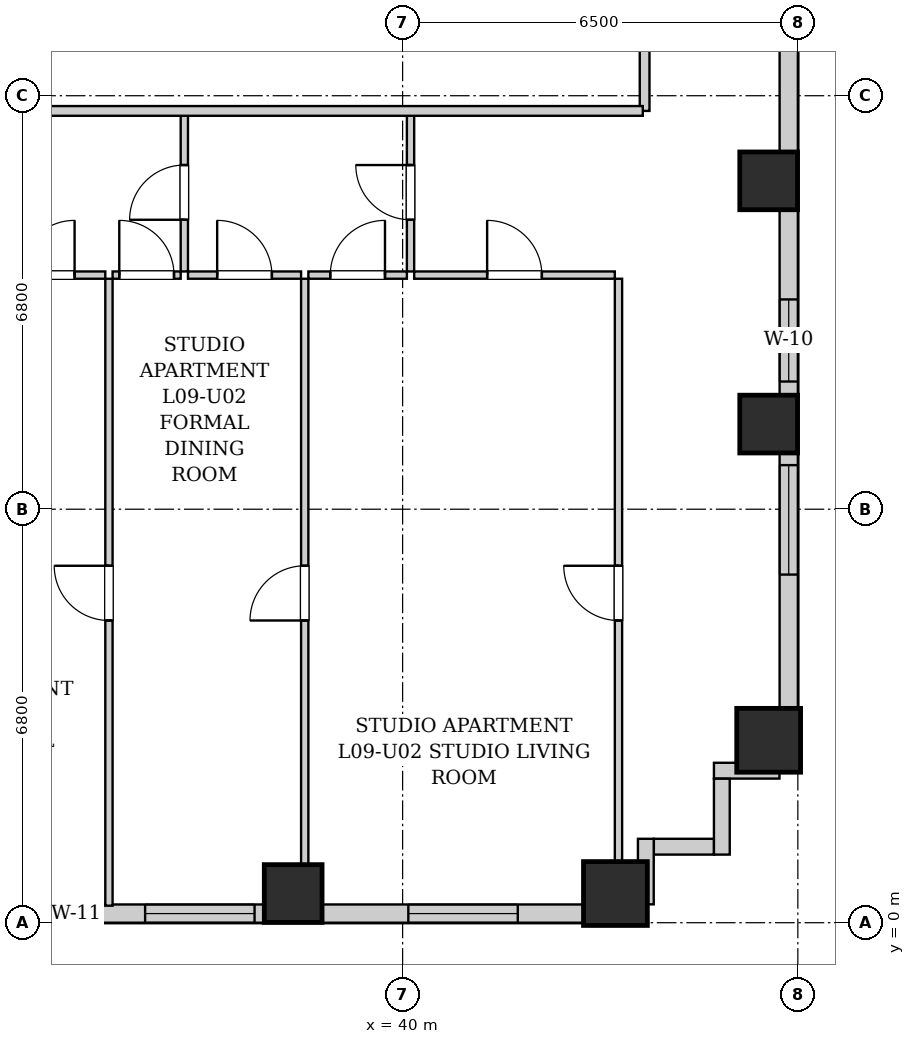
"""IFC4 building model, lengths in metres.
Left out: names, types, materials, properties, quantities, classifications, styles, units other than length and angle.
Written with IfcOpenShell. Run it as: python <this file> out.ifc"""

import sys

from ifc_helpers import new_model, si_unit, direction, frame, frame_2d, origin, origin_2d, place, context, subcontext, project, spatial, rectangle, extrude, element, fill, save


model = new_model("IFC4")
c1 = context("Model", 3, precision=1e-05, world=origin(), true_north=direction((0.0, 1.0)))
c2 = subcontext(c1, "Body", "Model", "MODEL_VIEW")
j1 = project(units=[si_unit("LENGTHUNIT", "METRE"), si_unit("PLANEANGLEUNIT", "RADIAN")], contexts=[c1])
p1 = place(None, origin())
s1 = spatial("IfcSite", under=j1, at=p1, CompositionType="ELEMENT")
p2 = place(p1, origin())
s2 = spatial("IfcBuilding", under=s1, at=p2, CompositionType="ELEMENT")
p3 = place(p2, frame((0.0, 0.0, 38.6)))
s3 = spatial("IfcBuildingStorey", under=s2, at=p3, CompositionType="ELEMENT", Elevation=38.6)
p4 = place(p3, frame((38.2, 0.48, 0.0), z_axis=(0.0, 0.0, 1.0), x_axis=(1.0, 0.0, 0.0)))
e1 = element("IfcColumn", 1, at=p4, inside=s3, PredefinedType="COLUMN", context=c2, shape_type="SweptSolid", body=[
    extrude(rectangle(XDim=0.95, YDim=0.95, at=origin_2d()), origin(), (0.0, 0.0, 1.0), 3.2),
])
for number, where, z_axis, x_axis in (
    (2, (43.5, 0.48, 0.0), (0.0, 0.0, 1.0), (1.0, 0.0, 0.0)),
    (3, (46.02, 3.0, 0.0), (0.0, 0.0, 1.0), (1.0, 0.0, 0.0)),
):
    element("IfcColumn", number, at=place(p3, frame(where, z_axis=z_axis, x_axis=x_axis)), inside=s3, PredefinedType="COLUMN", context=c2, shape_type="SweptSolid", body=[
        extrude(rectangle(XDim=1.05, YDim=1.05, at=origin_2d()), origin(), (0.0, 0.0, 1.0), 3.2),
    ])
for number, where, z_axis, x_axis in (
    (4, (46.02, 8.2, 0.0), (0.0, 0.0, 1.0), (1.0, 0.0, 0.0)),
    (5, (46.02, 12.2, 0.0), (0.0, 0.0, 1.0), (1.0, 0.0, 0.0)),
):
    element("IfcColumn", number, at=place(p3, frame(where, z_axis=z_axis, x_axis=x_axis)), inside=s3, PredefinedType="COLUMN", context=c2, shape_type="SweptSolid", body=[
        extrude(rectangle(XDim=0.95, YDim=0.95, at=origin_2d()), origin(), (0.0, 0.0, 1.0), 3.2),
    ])
p5 = place(p3, frame((46.35, 45.1, 0.0), z_axis=(0.0, 0.0, 1.0), x_axis=(0.0, -1.0, 0.0)))
e6 = element("IfcWall", 6, at=p5, inside=s3, PredefinedType="SOLIDWALL", context=c2, shape_type="SweptSolid", body=[
    extrude(rectangle(XDim=42.6, YDim=0.3, at=frame_2d((21.3, 0.0))), origin(), (0.0, 0.0, 1.0), 1.975),
])
p6 = place(p5, frame((37.575, 0.0, 0.55)))
e7 = element("IfcOpeningElement", 7, at=p6, cuts=e6, PredefinedType="OPENING", context=c2, shape_type="SweptSolid", body=[
    extrude(rectangle(XDim=1.8, YDim=1.2, at=frame_2d((0.9, 0.6))), frame((0.0, 0.16, 0.0), z_axis=(0.0, -1.0, 0.0), x_axis=(1.0, 0.0, 0.0)), (0.0, 0.0, 1.0), 0.32),
])
p7 = place(p5, frame((34.85, 0.0, 0.55)))
e8 = element("IfcOpeningElement", 8, at=p7, cuts=e6, PredefinedType="OPENING", context=c2, shape_type="SweptSolid", body=[
    extrude(rectangle(XDim=1.35, YDim=1.2, at=frame_2d((0.675, 0.6))), frame((0.0, 0.16, 0.0), z_axis=(0.0, -1.0, 0.0), x_axis=(1.0, 0.0, 0.0)), (0.0, 0.0, 1.0), 0.32),
])
p8 = place(p5, frame((3.665, 0.0, 0.55)))
e9 = element("IfcOpeningElement", 9, at=p8, cuts=e6, PredefinedType="OPENING", context=c2, shape_type="SweptSolid", body=[
    extrude(rectangle(XDim=1.8, YDim=1.2, at=frame_2d((0.9, 0.6))), frame((0.0, 0.16, 0.0), z_axis=(0.0, -1.0, 0.0), x_axis=(1.0, 0.0, 0.0)), (0.0, 0.0, 1.0), 0.32),
])
p9 = place(p5, frame((1.185, 0.0, 0.55)))
e10 = element("IfcOpeningElement", 10, at=p9, cuts=e6, PredefinedType="OPENING", context=c2, shape_type="SweptSolid", body=[
    extrude(rectangle(XDim=1.35, YDim=1.2, at=frame_2d((0.675, 0.6))), frame((0.0, 0.16, 0.0), z_axis=(0.0, -1.0, 0.0), x_axis=(1.0, 0.0, 0.0)), (0.0, 0.0, 1.0), 0.32),
])
p10 = place(p5, frame((27.225, 0.0, 0.55)))
e11 = element("IfcOpeningElement", 11, at=p10, cuts=e6, PredefinedType="OPENING", context=c2, shape_type="SweptSolid", body=[
    extrude(rectangle(XDim=1.8, YDim=1.2, at=frame_2d((0.9, 0.6))), frame((0.0, 0.16, 0.0), z_axis=(0.0, -1.0, 0.0), x_axis=(1.0, 0.0, 0.0)), (0.0, 0.0, 1.0), 0.32),
])
p11 = place(p5, frame((17.1, 0.0, 0.55)))
e12 = element("IfcOpeningElement", 12, at=p11, cuts=e6, PredefinedType="OPENING", context=c2, shape_type="SweptSolid", body=[
    extrude(rectangle(XDim=1.8, YDim=1.2, at=frame_2d((0.9, 0.6))), frame((0.0, 0.16, 0.0), z_axis=(0.0, -1.0, 0.0), x_axis=(1.0, 0.0, 0.0)), (0.0, 0.0, 1.0), 0.32),
])
p12 = place(p3, frame((44.0, 0.15, 0.0), z_axis=(0.0, 0.0, 1.0), x_axis=(-1.0, 0.0, 0.0)))
e13 = element("IfcWall", 13, at=p12, inside=s3, PredefinedType="SOLIDWALL", context=c2, shape_type="SweptSolid", body=[
    extrude(rectangle(XDim=25.7, YDim=0.3, at=frame_2d((12.85, 0.0))), origin(), (0.0, 0.0, 1.0), 1.975),
])
p13 = place(p12, frame((22.471, 0.0, 0.55)))
e14 = element("IfcOpeningElement", 14, at=p13, cuts=e13, PredefinedType="OPENING", context=c2, shape_type="SweptSolid", body=[
    extrude(rectangle(XDim=1.8, YDim=1.2, at=frame_2d((0.9, 0.6))), frame((0.0, 0.16, 0.0), z_axis=(0.0, -1.0, 0.0), x_axis=(1.0, 0.0, 0.0)), (0.0, 0.0, 1.0), 0.32),
])
p14 = place(p12, frame((15.65, 0.0, 0.55)))
e15 = element("IfcOpeningElement", 15, at=p14, cuts=e13, PredefinedType="OPENING", context=c2, shape_type="SweptSolid", body=[
    extrude(rectangle(XDim=0.85, YDim=1.2, at=frame_2d((0.425, 0.6))), frame((0.0, 0.16, 0.0), z_axis=(0.0, -1.0, 0.0), x_axis=(1.0, 0.0, 0.0)), (0.0, 0.0, 1.0), 0.32),
])
p15 = place(p12, frame((12.777, 0.0, 0.55)))
e16 = element("IfcOpeningElement", 16, at=p15, cuts=e13, PredefinedType="OPENING", context=c2, shape_type="SweptSolid", body=[
    extrude(rectangle(XDim=1.8, YDim=1.2, at=frame_2d((0.9, 0.6))), frame((0.0, 0.16, 0.0), z_axis=(0.0, -1.0, 0.0), x_axis=(1.0, 0.0, 0.0)), (0.0, 0.0, 1.0), 0.32),
])
p16 = place(p12, frame((9.315, 0.0, 0.55)))
e17 = element("IfcOpeningElement", 17, at=p16, cuts=e13, PredefinedType="OPENING", context=c2, shape_type="SweptSolid", body=[
    extrude(rectangle(XDim=0.85, YDim=1.2, at=frame_2d((0.425, 0.6))), frame((0.0, 0.16, 0.0), z_axis=(0.0, -1.0, 0.0), x_axis=(1.0, 0.0, 0.0)), (0.0, 0.0, 1.0), 0.32),
])
p17 = place(p12, frame((6.435, 0.0, 0.55)))
e18 = element("IfcOpeningElement", 18, at=p17, cuts=e13, PredefinedType="OPENING", context=c2, shape_type="SweptSolid", body=[
    extrude(rectangle(XDim=1.8, YDim=1.2, at=frame_2d((0.9, 0.6))), frame((0.0, 0.16, 0.0), z_axis=(0.0, -1.0, 0.0), x_axis=(1.0, 0.0, 0.0)), (0.0, 0.0, 1.0), 0.32),
])
p18 = place(p12, frame((2.106, 0.0, 0.55)))
e19 = element("IfcOpeningElement", 19, at=p18, cuts=e13, PredefinedType="OPENING", context=c2, shape_type="SweptSolid", body=[
    extrude(rectangle(XDim=1.8, YDim=1.2, at=frame_2d((0.9, 0.6))), frame((0.0, 0.16, 0.0), z_axis=(0.0, -1.0, 0.0), x_axis=(1.0, 0.0, 0.0)), (0.0, 0.0, 1.0), 0.32),
])
p19 = place(p3, frame((46.198, 2.5, 0.0), z_axis=(0.0, 0.0, 1.0), x_axis=(-1.0, 0.0, 0.0)))
e20 = element("IfcWall", 20, at=p19, inside=s3, PredefinedType="SOLIDWALL", context=c2, shape_type="SweptSolid", body=[
    extrude(rectangle(XDim=1.078, YDim=0.26, at=frame_2d((0.539, 0.0))), origin(), (0.0, 0.0, 1.0), 2.94),
])
p20 = place(p3, frame((45.25, 2.368, 0.0), z_axis=(0.0, 0.0, 1.0), x_axis=(0.0, -1.0, 0.0)))
e21 = element("IfcWall", 21, at=p20, inside=s3, PredefinedType="SOLIDWALL", context=c2, shape_type="SweptSolid", body=[
    extrude(rectangle(XDim=1.248, YDim=0.26, at=frame_2d((0.624, 0.0))), origin(), (0.0, 0.0, 1.0), 2.94),
])
p21 = place(p3, frame((45.118, 1.25, 0.0), z_axis=(0.0, 0.0, 1.0), x_axis=(-1.0, 0.0, 0.0)))
e22 = element("IfcWall", 22, at=p21, inside=s3, PredefinedType="SOLIDWALL", context=c2, shape_type="SweptSolid", body=[
    extrude(rectangle(XDim=0.986, YDim=0.26, at=frame_2d((0.493, 0.0))), origin(), (0.0, 0.0, 1.0), 2.94),
])
p22 = place(p3, frame((44.0, 1.38, 0.0), z_axis=(0.0, 0.0, 1.0), x_axis=(0.0, -1.0, 0.0)))
e23 = element("IfcWall", 23, at=p22, inside=s3, PredefinedType="SOLIDWALL", context=c2, shape_type="SweptSolid", body=[
    extrude(rectangle(XDim=1.078, YDim=0.26, at=frame_2d((0.539, 0.0))), origin(), (0.0, 0.0, 1.0), 2.94),
])
p23 = place(p3, frame((43.98, 13.35, 0.0), z_axis=(0.0, 0.0, 1.0), x_axis=(0.0, 1.0, 0.0)))
e24 = element("IfcWall", 24, at=p23, inside=s3, PredefinedType="PARTITIONING", context=c2, shape_type="SweptSolid", body=[
    extrude(rectangle(XDim=1.74, YDim=0.16, at=frame_2d((0.87, 0.0))), origin(), (0.0, 0.0, 1.0), 2.94),
])
p24 = place(p3, frame((36.41, 10.71, 0.0), z_axis=(0.0, 0.0, 1.0), x_axis=(0.0, 1.0, 0.0)))
e25 = element("IfcWall", 25, at=p24, inside=s3, PredefinedType="PARTITIONING", context=c2, shape_type="SweptSolid", body=[
    extrude(rectangle(XDim=2.6, YDim=0.12, at=frame_2d((1.3, 0.0))), origin(), (0.0, 0.0, 1.0), 2.94),
])
p25 = place(p24, frame((0.85, 0.0, 0.0)))
e26 = element("IfcOpeningElement", 26, at=p25, cuts=e25, PredefinedType="OPENING", context=c2, shape_type="SweptSolid", body=[
    extrude(rectangle(XDim=0.9, YDim=2.05, at=frame_2d((0.45, 1.025))), frame((0.0, 0.07, 0.0), z_axis=(0.0, -1.0, 0.0), x_axis=(1.0, 0.0, 0.0)), (0.0, 0.0, 1.0), 0.14),
])
p26 = place(p3, frame((33.2, 10.65, 0.0), z_axis=(0.0, 0.0, 1.0), x_axis=(1.0, 0.0, 0.0)))
e27 = element("IfcWall", 27, at=p26, inside=s3, PredefinedType="PARTITIONING", context=c2, shape_type="SweptSolid", body=[
    extrude(rectangle(XDim=1.91, YDim=0.12, at=frame_2d((0.955, 0.0))), origin(), (0.0, 0.0, 1.0), 2.94),
])
p27 = place(p26, frame((0.505, 0.0, 0.0)))
e28 = element("IfcOpeningElement", 28, at=p27, cuts=e27, PredefinedType="OPENING", context=c2, shape_type="SweptSolid", body=[
    extrude(rectangle(XDim=0.9, YDim=2.05, at=frame_2d((0.45, 1.025))), frame((0.0, 0.07, 0.0), z_axis=(0.0, -1.0, 0.0), x_axis=(1.0, 0.0, 0.0)), (0.0, 0.0, 1.0), 0.14),
])
p28 = place(p3, frame((35.23, 10.65, 0.0), z_axis=(0.0, 0.0, 1.0), x_axis=(1.0, 0.0, 0.0)))
e29 = element("IfcWall", 29, at=p28, inside=s3, PredefinedType="PARTITIONING", context=c2, shape_type="SweptSolid", body=[
    extrude(rectangle(XDim=1.12, YDim=0.12, at=frame_2d((0.56, 0.0))), origin(), (0.0, 0.0, 1.0), 2.94),
])
p29 = place(p28, frame((0.11, 0.0, 0.0)))
e30 = element("IfcOpeningElement", 30, at=p29, cuts=e29, PredefinedType="OPENING", context=c2, shape_type="SweptSolid", body=[
    extrude(rectangle(XDim=0.9, YDim=2.05, at=frame_2d((0.45, 1.025))), frame((0.0, 0.07, 0.0), z_axis=(0.0, -1.0, 0.0), x_axis=(1.0, 0.0, 0.0)), (0.0, 0.0, 1.0), 0.14),
])
p30 = place(p3, frame((40.13, 10.71, 0.0), z_axis=(0.0, 0.0, 1.0), x_axis=(0.0, 1.0, 0.0)))
e31 = element("IfcWall", 31, at=p30, inside=s3, PredefinedType="PARTITIONING", context=c2, shape_type="SweptSolid", body=[
    extrude(rectangle(XDim=2.6, YDim=0.12, at=frame_2d((1.3, 0.0))), origin(), (0.0, 0.0, 1.0), 2.94),
])
p31 = place(p30, frame((0.85, 0.0, 0.0)))
e32 = element("IfcOpeningElement", 32, at=p31, cuts=e31, PredefinedType="OPENING", context=c2, shape_type="SweptSolid", body=[
    extrude(rectangle(XDim=0.9, YDim=2.05, at=frame_2d((0.45, 1.025))), frame((0.0, 0.07, 0.0), z_axis=(0.0, -1.0, 0.0), x_axis=(1.0, 0.0, 0.0)), (0.0, 0.0, 1.0), 0.14),
])
p32 = place(p3, frame((36.47, 10.65, 0.0), z_axis=(0.0, 0.0, 1.0), x_axis=(1.0, 0.0, 0.0)))
e33 = element("IfcWall", 33, at=p32, inside=s3, PredefinedType="PARTITIONING", context=c2, shape_type="SweptSolid", body=[
    extrude(rectangle(XDim=1.86, YDim=0.12, at=frame_2d((0.93, 0.0))), origin(), (0.0, 0.0, 1.0), 2.94),
])
p33 = place(p32, frame((0.48, 0.0, 0.0)))
e34 = element("IfcOpeningElement", 34, at=p33, cuts=e33, PredefinedType="OPENING", context=c2, shape_type="SweptSolid", body=[
    extrude(rectangle(XDim=0.9, YDim=2.05, at=frame_2d((0.45, 1.025))), frame((0.0, 0.07, 0.0), z_axis=(0.0, -1.0, 0.0), x_axis=(1.0, 0.0, 0.0)), (0.0, 0.0, 1.0), 0.14),
])
p34 = place(p3, frame((38.45, 10.65, 0.0), z_axis=(0.0, 0.0, 1.0), x_axis=(1.0, 0.0, 0.0)))
e35 = element("IfcWall", 35, at=p34, inside=s3, PredefinedType="PARTITIONING", context=c2, shape_type="SweptSolid", body=[
    extrude(rectangle(XDim=1.62, YDim=0.12, at=frame_2d((0.81, 0.0))), origin(), (0.0, 0.0, 1.0), 2.94),
])
p35 = place(p34, frame((0.36, 0.0, 0.0)))
e36 = element("IfcOpeningElement", 36, at=p35, cuts=e35, PredefinedType="OPENING", context=c2, shape_type="SweptSolid", body=[
    extrude(rectangle(XDim=0.9, YDim=2.05, at=frame_2d((0.45, 1.025))), frame((0.0, 0.07, 0.0), z_axis=(0.0, -1.0, 0.0), x_axis=(1.0, 0.0, 0.0)), (0.0, 0.0, 1.0), 0.14),
])
p36 = place(p3, frame((40.19, 10.65, 0.0), z_axis=(0.0, 0.0, 1.0), x_axis=(1.0, 0.0, 0.0)))
e37 = element("IfcWall", 37, at=p36, inside=s3, PredefinedType="PARTITIONING", context=c2, shape_type="SweptSolid", body=[
    extrude(rectangle(XDim=3.3, YDim=0.12, at=frame_2d((1.65, 0.0))), origin(), (0.0, 0.0, 1.0), 2.94),
])
p37 = place(p36, frame((1.2, 0.0, 0.0)))
e38 = element("IfcOpeningElement", 38, at=p37, cuts=e37, PredefinedType="OPENING", context=c2, shape_type="SweptSolid", body=[
    extrude(rectangle(XDim=0.9, YDim=2.05, at=frame_2d((0.45, 1.025))), frame((0.0, 0.07, 0.0), z_axis=(0.0, -1.0, 0.0), x_axis=(1.0, 0.0, 0.0)), (0.0, 0.0, 1.0), 0.14),
])
p38 = place(p3, frame((35.17, 0.28, 0.0), z_axis=(0.0, 0.0, 1.0), x_axis=(0.0, 1.0, 0.0)))
e39 = element("IfcWall", 39, at=p38, inside=s3, PredefinedType="PARTITIONING", context=c2, shape_type="SweptSolid", body=[
    extrude(rectangle(XDim=10.31, YDim=0.12, at=frame_2d((5.155, 0.0))), origin(), (0.0, 0.0, 1.0), 2.94),
])
p39 = place(p38, frame((4.69, 0.0, 0.0)))
e40 = element("IfcOpeningElement", 40, at=p39, cuts=e39, PredefinedType="OPENING", context=c2, shape_type="SweptSolid", body=[
    extrude(rectangle(XDim=0.9, YDim=2.05, at=frame_2d((0.45, 1.025))), frame((0.0, 0.07, 0.0), z_axis=(0.0, -1.0, 0.0), x_axis=(1.0, 0.0, 0.0)), (0.0, 0.0, 1.0), 0.14),
])
p40 = place(p3, frame((38.39, 0.28, 0.0), z_axis=(0.0, 0.0, 1.0), x_axis=(0.0, 1.0, 0.0)))
e41 = element("IfcWall", 41, at=p40, inside=s3, PredefinedType="PARTITIONING", context=c2, shape_type="SweptSolid", body=[
    extrude(rectangle(XDim=10.31, YDim=0.12, at=frame_2d((5.155, 0.0))), origin(), (0.0, 0.0, 1.0), 2.94),
])
p41 = place(p40, frame((4.69, 0.0, 0.0)))
e42 = element("IfcOpeningElement", 42, at=p41, cuts=e41, PredefinedType="OPENING", context=c2, shape_type="SweptSolid", body=[
    extrude(rectangle(XDim=0.9, YDim=2.05, at=frame_2d((0.45, 1.025))), frame((0.0, 0.07, 0.0), z_axis=(0.0, -1.0, 0.0), x_axis=(1.0, 0.0, 0.0)), (0.0, 0.0, 1.0), 0.14),
])
p42 = place(p3, frame((43.55, 0.28, 0.0), z_axis=(0.0, 0.0, 1.0), x_axis=(0.0, 1.0, 0.0)))
e43 = element("IfcWall", 43, at=p42, inside=s3, PredefinedType="PARTITIONING", context=c2, shape_type="SweptSolid", body=[
    extrude(rectangle(XDim=10.31, YDim=0.12, at=frame_2d((5.155, 0.0))), origin(), (0.0, 0.0, 1.0), 2.94),
])
p43 = place(p42, frame((4.69, 0.0, 0.0)))
e44 = element("IfcOpeningElement", 44, at=p43, cuts=e43, PredefinedType="OPENING", context=c2, shape_type="SweptSolid", body=[
    extrude(rectangle(XDim=0.9, YDim=2.05, at=frame_2d((0.45, 1.025))), frame((0.0, 0.07, 0.0), z_axis=(0.0, -1.0, 0.0), x_axis=(1.0, 0.0, 0.0)), (0.0, 0.0, 1.0), 0.14),
])
p44 = place(p3, frame((10.05, 13.35, 0.0), z_axis=(0.0, 0.0, 1.0), x_axis=(1.0, 0.0, 0.0)))
e45 = element("IfcWall", 45, at=p44, inside=s3, PredefinedType="PARTITIONING", context=c2, shape_type="SweptSolid", body=[
    extrude(rectangle(XDim=33.9, YDim=0.16, at=frame_2d((16.95, 0.0))), origin(), (0.0, 0.0, 1.0), 2.94),
])
p45 = place(p44, frame((3.8, 0.0, 0.0)))
e46 = element("IfcOpeningElement", 46, at=p45, cuts=e45, PredefinedType="OPENING", context=c2, shape_type="SweptSolid", body=[
    extrude(rectangle(XDim=0.95, YDim=2.1, at=frame_2d((0.475, 1.05))), frame((0.0, 0.09, 0.0), z_axis=(0.0, -1.0, 0.0), x_axis=(1.0, 0.0, 0.0)), (0.0, 0.0, 1.0), 0.18),
])
p46 = place(p44, frame((13.345, 0.0, 0.0)))
e47 = element("IfcOpeningElement", 47, at=p46, cuts=e45, PredefinedType="OPENING", context=c2, shape_type="SweptSolid", body=[
    extrude(rectangle(XDim=0.95, YDim=2.1, at=frame_2d((0.475, 1.05))), frame((0.0, 0.09, 0.0), z_axis=(0.0, -1.0, 0.0), x_axis=(1.0, 0.0, 0.0)), (0.0, 0.0, 1.0), 0.18),
])
p47 = place(p25, origin())
e48 = element("IfcDoor", 48, at=p47, inside=s3, OperationType="SINGLE_SWING_LEFT", PredefinedType="DOOR", context=c2, shape_type="SweptSolid", body=[
    extrude(rectangle(XDim=0.9, YDim=2.05, at=frame_2d((0.45, 1.025))), frame((0.0, 0.025, 0.0), z_axis=(0.0, -1.0, 0.0), x_axis=(1.0, 0.0, 0.0)), (0.0, 0.0, 1.0), 0.05),
])
fill(e26, e48)
p48 = place(p27, origin())
e49 = element("IfcDoor", 49, at=p48, inside=s3, OperationType="SINGLE_SWING_RIGHT", PredefinedType="DOOR", context=c2, shape_type="SweptSolid", body=[
    extrude(rectangle(XDim=0.9, YDim=2.05, at=frame_2d((0.45, 1.025))), frame((0.0, 0.025, 0.0), z_axis=(0.0, -1.0, 0.0), x_axis=(1.0, 0.0, 0.0)), (0.0, 0.0, 1.0), 0.05),
])
fill(e28, e49)
p49 = place(p29, origin())
e50 = element("IfcDoor", 50, at=p49, inside=s3, OperationType="SINGLE_SWING_LEFT", PredefinedType="DOOR", context=c2, shape_type="SweptSolid", body=[
    extrude(rectangle(XDim=0.9, YDim=2.05, at=frame_2d((0.45, 1.025))), frame((0.0, 0.025, 0.0), z_axis=(0.0, -1.0, 0.0), x_axis=(1.0, 0.0, 0.0)), (0.0, 0.0, 1.0), 0.05),
])
fill(e30, e50)
p50 = place(p31, origin())
e51 = element("IfcDoor", 51, at=p50, inside=s3, OperationType="SINGLE_SWING_RIGHT", PredefinedType="DOOR", context=c2, shape_type="SweptSolid", body=[
    extrude(rectangle(XDim=0.9, YDim=2.05, at=frame_2d((0.45, 1.025))), frame((0.0, 0.025, 0.0), z_axis=(0.0, -1.0, 0.0), x_axis=(1.0, 0.0, 0.0)), (0.0, 0.0, 1.0), 0.05),
])
fill(e32, e51)
p51 = place(p33, origin())
e52 = element("IfcDoor", 52, at=p51, inside=s3, OperationType="SINGLE_SWING_LEFT", PredefinedType="DOOR", context=c2, shape_type="SweptSolid", body=[
    extrude(rectangle(XDim=0.9, YDim=2.05, at=frame_2d((0.45, 1.025))), frame((0.0, 0.025, 0.0), z_axis=(0.0, -1.0, 0.0), x_axis=(1.0, 0.0, 0.0)), (0.0, 0.0, 1.0), 0.05),
])
fill(e34, e52)
p52 = place(p35, origin())
e53 = element("IfcDoor", 53, at=p52, inside=s3, OperationType="SINGLE_SWING_RIGHT", PredefinedType="DOOR", context=c2, shape_type="SweptSolid", body=[
    extrude(rectangle(XDim=0.9, YDim=2.05, at=frame_2d((0.45, 1.025))), frame((0.0, 0.025, 0.0), z_axis=(0.0, -1.0, 0.0), x_axis=(1.0, 0.0, 0.0)), (0.0, 0.0, 1.0), 0.05),
])
fill(e36, e53)
p53 = place(p37, origin())
e54 = element("IfcDoor", 54, at=p53, inside=s3, OperationType="SINGLE_SWING_LEFT", PredefinedType="DOOR", context=c2, shape_type="SweptSolid", body=[
    extrude(rectangle(XDim=0.9, YDim=2.05, at=frame_2d((0.45, 1.025))), frame((0.0, 0.025, 0.0), z_axis=(0.0, -1.0, 0.0), x_axis=(1.0, 0.0, 0.0)), (0.0, 0.0, 1.0), 0.05),
])
fill(e38, e54)
p54 = place(p39, origin())
e55 = element("IfcDoor", 55, at=p54, inside=s3, OperationType="SINGLE_SWING_RIGHT", PredefinedType="DOOR", context=c2, shape_type="SweptSolid", body=[
    extrude(rectangle(XDim=0.9, YDim=2.05, at=frame_2d((0.45, 1.025))), frame((0.0, 0.025, 0.0), z_axis=(0.0, -1.0, 0.0), x_axis=(1.0, 0.0, 0.0)), (0.0, 0.0, 1.0), 0.05),
])
fill(e40, e55)
p55 = place(p41, origin())
e56 = element("IfcDoor", 56, at=p55, inside=s3, OperationType="SINGLE_SWING_LEFT", PredefinedType="DOOR", context=c2, shape_type="SweptSolid", body=[
    extrude(rectangle(XDim=0.9, YDim=2.05, at=frame_2d((0.45, 1.025))), frame((0.0, 0.025, 0.0), z_axis=(0.0, -1.0, 0.0), x_axis=(1.0, 0.0, 0.0)), (0.0, 0.0, 1.0), 0.05),
])
fill(e42, e56)
p56 = place(p43, origin())
e57 = element("IfcDoor", 57, at=p56, inside=s3, OperationType="SINGLE_SWING_RIGHT", PredefinedType="DOOR", context=c2, shape_type="SweptSolid", body=[
    extrude(rectangle(XDim=0.9, YDim=2.05, at=frame_2d((0.45, 1.025))), frame((0.0, 0.025, 0.0), z_axis=(0.0, -1.0, 0.0), x_axis=(1.0, 0.0, 0.0)), (0.0, 0.0, 1.0), 0.05),
])
fill(e44, e57)
p57 = place(p16, origin())
e58 = element("IfcWindow", 58, at=p57, inside=s3, PartitioningType="SINGLE_PANEL", PredefinedType="WINDOW", context=c2, shape_type="SweptSolid", body=[
    extrude(rectangle(XDim=0.85, YDim=1.2, at=frame_2d((0.425, 0.6))), frame((0.0, 0.03, 0.0), z_axis=(0.0, -1.0, 0.0), x_axis=(1.0, 0.0, 0.0)), (0.0, 0.0, 1.0), 0.06),
])
fill(e17, e58)
p58 = place(p17, origin())
e59 = element("IfcWindow", 59, at=p58, inside=s3, PartitioningType="DOUBLE_PANEL_VERTICAL", PredefinedType="WINDOW", context=c2, shape_type="SweptSolid", body=[
    extrude(rectangle(XDim=1.8, YDim=1.2, at=frame_2d((0.9, 0.6))), frame((0.0, 0.03, 0.0), z_axis=(0.0, -1.0, 0.0), x_axis=(1.0, 0.0, 0.0)), (0.0, 0.0, 1.0), 0.06),
])
fill(e18, e59)
p59 = place(p18, origin())
e60 = element("IfcWindow", 60, at=p59, inside=s3, PartitioningType="DOUBLE_PANEL_VERTICAL", PredefinedType="WINDOW", context=c2, shape_type="SweptSolid", body=[
    extrude(rectangle(XDim=1.8, YDim=1.2, at=frame_2d((0.9, 0.6))), frame((0.0, 0.03, 0.0), z_axis=(0.0, -1.0, 0.0), x_axis=(1.0, 0.0, 0.0)), (0.0, 0.0, 1.0), 0.06),
])
fill(e19, e60)
p60 = place(p6, origin())
e61 = element("IfcWindow", 61, at=p60, inside=s3, PartitioningType="DOUBLE_PANEL_VERTICAL", PredefinedType="WINDOW", context=c2, shape_type="SweptSolid", body=[
    extrude(rectangle(XDim=1.8, YDim=1.2, at=frame_2d((0.9, 0.6))), frame((0.0, 0.03, 0.0), z_axis=(0.0, -1.0, 0.0), x_axis=(1.0, 0.0, 0.0)), (0.0, 0.0, 1.0), 0.06),
])
fill(e7, e61)
p61 = place(p7, origin())
e62 = element("IfcWindow", 62, at=p61, inside=s3, PartitioningType="SINGLE_PANEL", PredefinedType="WINDOW", context=c2, shape_type="SweptSolid", body=[
    extrude(rectangle(XDim=1.35, YDim=1.2, at=frame_2d((0.675, 0.6))), frame((0.0, 0.03, 0.0), z_axis=(0.0, -1.0, 0.0), x_axis=(1.0, 0.0, 0.0)), (0.0, 0.0, 1.0), 0.06),
])
fill(e8, e62)
save(model, sys.argv[1])
